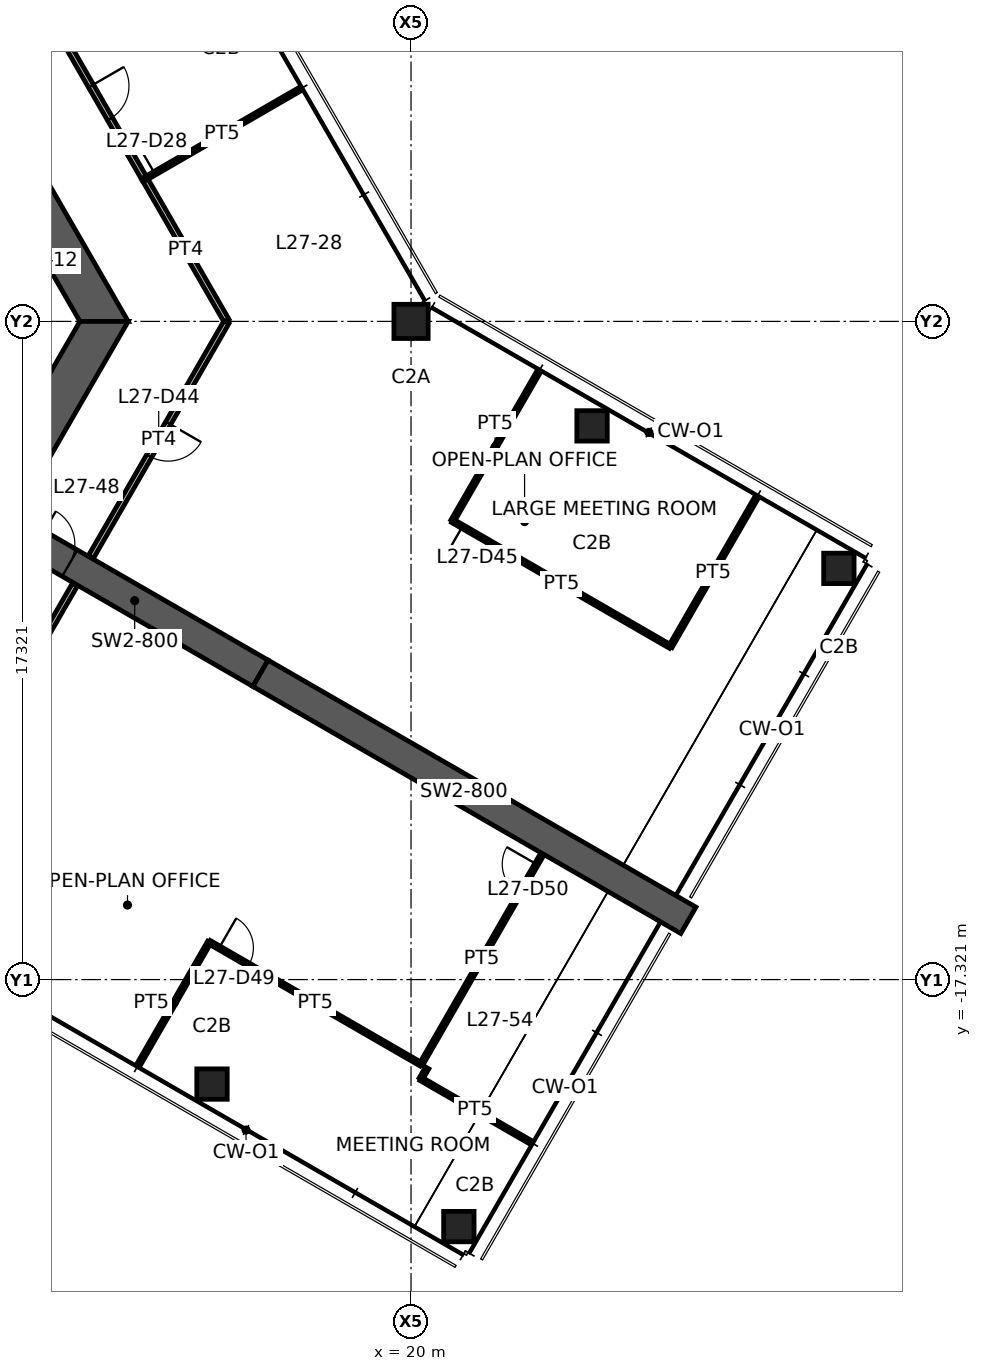
"""IFC4 building model, lengths in metres.
Left out: names, types, materials, properties, quantities, classifications, styles, units other than length and angle.
Written with IfcOpenShell. Run it as: python <this file> out.ifc"""

import sys

from ifc_helpers import new_model, si_unit, direction, frame, frame_2d, origin, origin_2d, place, context, subcontext, project, spatial, polyline, rectangle, hollow_rectangle, outline, extrude, element, fill, save


model = new_model("IFC4")
c1 = context("Model", 3, precision=1e-05, world=origin(), true_north=direction((0.0, 1.0)))
c2 = subcontext(c1, "Body", "Model", "MODEL_VIEW")
j1 = project(units=[si_unit("LENGTHUNIT", "METRE"), si_unit("PLANEANGLEUNIT", "RADIAN")], contexts=[c1])
p1 = place(None, origin())
s1 = spatial("IfcSite", under=j1, at=p1, CompositionType="ELEMENT")
p2 = place(p1, origin())
s2 = spatial("IfcBuilding", under=s1, at=p2, CompositionType="ELEMENT")
p3 = place(p2, frame((0.0, 0.0, 108.0)))
s3 = spatial("IfcBuildingStorey", under=s2, at=p3, CompositionType="ELEMENT", Elevation=108.0)
p4 = place(p3, frame((20.0, 0.0, 0.0), z_axis=(0.0, 0.0, 1.0), x_axis=(1.0, 0.0, 0.0)))
e1 = element("IfcColumn", 1, at=p4, inside=s3, PredefinedType="COLUMN", context=c2, shape_type="SweptSolid", body=[
    extrude(hollow_rectangle(XDim=0.9, YDim=0.9, WallThickness=0.055, at=origin_2d()), origin(), (0.0, 0.0, 1.0), 3.9),
])
for number, where, z_axis, x_axis in (
    (2, (14.763, -20.071, 0.0), (0.0, 0.0, 1.0), (1.0, 0.0, 0.0)),
    (3, (21.258, -23.821, 0.0), (0.0, 0.0, 1.0), (1.0, 0.0, 0.0)),
    (4, (24.763, -2.75, 0.0), (0.0, 0.0, 1.0), (1.0, 0.0, 0.0)),
    (5, (31.258, -6.5, 0.0), (0.0, 0.0, 1.0), (1.0, 0.0, 0.0)),
):
    element("IfcColumn", number, at=place(p3, frame(where, z_axis=z_axis, x_axis=x_axis)), inside=s3, PredefinedType="COLUMN", context=c2, shape_type="SweptSolid", body=[
        extrude(hollow_rectangle(XDim=0.8, YDim=0.8, WallThickness=0.045, at=origin_2d()), origin(), (0.0, 0.0, 1.0), 3.9),
    ])
p5 = place(p3, frame((11.922, 0.0, 0.0), z_axis=(0.0, 0.0, 1.0), x_axis=(-0.500004296715, 0.866022923061, 0.0)))
e6 = element("IfcWall", 6, at=p5, inside=s3, PredefinedType="SHEAR", context=c2, shape_type="SweptSolid", body=[
    extrude(outline(polyline([(-0.318, -0.55), (5.835, -0.55), (6.635, -0.55), (12.24, -0.55), (11.605, 0.55), (6.635, 0.55), (5.835, 0.55), (0.318, 0.55), (-0.318, -0.55)])), origin(), (0.0, 0.0, 1.0), 3.9),
])
p6 = place(p5, frame((5.835, 0.0, 0.0)))
e7 = element("IfcOpeningElement", 7, at=p6, cuts=e6, PredefinedType="OPENING", context=c2, shape_type="SweptSolid", body=[
    extrude(rectangle(XDim=0.8, YDim=2.1, at=frame_2d((0.4, 1.05))), frame((0.0, 0.56, 0.0), z_axis=(0.0, -1.0, 0.0), x_axis=(1.0, 0.0, 0.0)), (0.0, 0.0, 1.0), 1.12),
])
p7 = place(p3, frame((5.961, -10.325, 0.0), z_axis=(0.0, 0.0, 1.0), x_axis=(0.500004296715, 0.866022923061, 0.0)))
e8 = element("IfcWall", 8, at=p7, inside=s3, PredefinedType="SHEAR", context=c2, shape_type="SweptSolid", body=[
    extrude(outline(polyline([(-0.318, -0.55), (4.594, -0.55), (5.394, -0.55), (12.24, -0.55), (11.605, 0.55), (5.394, 0.55), (4.594, 0.55), (0.318, 0.55), (-0.318, -0.55)])), origin(), (0.0, 0.0, 1.0), 3.9),
])
p8 = place(p7, frame((4.594, 0.0, 0.0)))
e9 = element("IfcOpeningElement", 9, at=p8, cuts=e8, PredefinedType="OPENING", context=c2, shape_type="SweptSolid", body=[
    extrude(rectangle(XDim=0.8, YDim=2.1, at=frame_2d((0.4, 1.05))), frame((0.0, 0.56, 0.0), z_axis=(0.0, -1.0, 0.0), x_axis=(1.0, 0.0, 0.0)), (0.0, 0.0, 1.0), 1.12),
])
p9 = place(p3, frame((9.418, -5.438, 0.0), z_axis=(0.0, 0.0, 1.0), x_axis=(0.866029782078, -0.499992416496, 0.0)))
e10 = element("IfcWall", 10, at=p9, inside=s3, PredefinedType="SHEAR", context=c2, shape_type="SweptSolid", body=[
    extrude(rectangle(XDim=7.646, YDim=0.8, at=frame_2d((3.823, 0.0))), origin(), (0.0, 0.0, 1.0), 3.9),
])
p10 = place(p9, frame((0.85, 0.0, 0.0)))
e11 = element("IfcOpeningElement", 11, at=p10, cuts=e10, PredefinedType="OPENING", context=c2, shape_type="SweptSolid", body=[
    extrude(rectangle(XDim=1.0, YDim=2.1, at=frame_2d((0.5, 1.05))), frame((0.0, 0.41, 0.0), z_axis=(0.0, -1.0, 0.0), x_axis=(1.0, 0.0, 0.0)), (0.0, 0.0, 1.0), 0.82),
])
p11 = place(p3, frame((16.039, -9.26, 0.0), z_axis=(0.0, 0.0, 1.0), x_axis=(0.866024837091, -0.50000098154, 0.0)))
e12 = element("IfcWall", 12, at=p11, inside=s3, PredefinedType="SHEAR", context=c2, shape_type="SweptSolid", body=[
    extrude(rectangle(XDim=13.0, YDim=0.8, at=frame_2d((6.5, 0.0))), origin(), (0.0, 0.0, 1.0), 3.9),
])
p12 = place(p3, frame((12.987, 3.755, 0.0), z_axis=(0.0, 0.0, 1.0), x_axis=(0.499980509014, -0.866036656618, 0.0)))
e13 = element("IfcWall", 13, at=p12, inside=s3, PredefinedType="PARTITIONING", context=c2, shape_type="SweptSolid", body=[
    extrude(rectangle(XDim=4.313, YDim=0.15, at=frame_2d((2.157, 0.0))), origin(), (0.0, 0.0, 1.0), 2.95),
])
p13 = place(p3, frame((10.664, 7.779, 0.0), z_axis=(0.0, 0.0, 1.0), x_axis=(0.500008456887, -0.866020521143, 0.0)))
e14 = element("IfcWall", 14, at=p13, inside=s3, PredefinedType="PARTITIONING", context=c2, shape_type="SweptSolid", body=[
    extrude(rectangle(XDim=4.655, YDim=0.15, at=frame_2d((2.328, 0.0))), origin(), (0.0, 0.0, 1.0), 2.95),
])
p14 = place(p13, frame((1.828, 0.0, 0.0)))
e15 = element("IfcOpeningElement", 15, at=p14, cuts=e14, PredefinedType="OPENING", context=c2, shape_type="SweptSolid", body=[
    extrude(rectangle(XDim=1.0, YDim=2.1, at=frame_2d((0.5, 1.05))), frame((0.0, 0.085, 0.0), z_axis=(0.0, -1.0, 0.0), x_axis=(1.0, 0.0, 0.0)), (0.0, 0.0, 1.0), 0.17),
])
p15 = place(p3, frame((12.992, 3.747, 0.0), z_axis=(0.0, 0.0, 1.0), x_axis=(0.865555596133, 0.500812849279, 0.0)))
e16 = element("IfcWall", 16, at=p15, inside=s3, PredefinedType="PARTITIONING", context=c2, shape_type="SweptSolid", body=[
    extrude(rectangle(XDim=4.696, YDim=0.1, at=frame_2d((2.348, 0.0))), origin(), (0.0, 0.0, 1.0), 2.95),
])
p16 = place(p15, frame((0.3, 0.0, 0.0)))
e17 = element("IfcOpeningElement", 17, at=p16, cuts=e16, PredefinedType="OPENING", context=c2, shape_type="SweptSolid", body=[
    extrude(rectangle(XDim=0.9, YDim=2.1, at=frame_2d((0.45, 1.05))), frame((0.0, 0.06, 0.0), z_axis=(0.0, -1.0, 0.0), x_axis=(1.0, 0.0, 0.0)), (0.0, 0.0, 1.0), 0.12),
])
p17 = place(p3, frame((15.144, -0.02, 0.0), z_axis=(0.0, 0.0, 1.0), x_axis=(-0.499985098601, -0.86603400694, 0.0)))
e18 = element("IfcWall", 18, at=p17, inside=s3, PredefinedType="PARTITIONING", context=c2, shape_type="SweptSolid", body=[
    extrude(rectangle(XDim=7.135, YDim=0.15, at=frame_2d((3.567, 0.0))), origin(), (0.0, 0.0, 1.0), 2.95),
])
p18 = place(p17, frame((3.067, 0.0, 0.0)))
e19 = element("IfcOpeningElement", 19, at=p18, cuts=e18, PredefinedType="OPENING", context=c2, shape_type="SweptSolid", body=[
    extrude(rectangle(XDim=1.0, YDim=2.1, at=frame_2d((0.5, 1.05))), frame((0.0, 0.085, 0.0), z_axis=(0.0, -1.0, 0.0), x_axis=(1.0, 0.0, 0.0)), (0.0, 0.0, 1.0), 0.17),
])
p19 = place(p3, frame((21.092, -5.25, 0.0), z_axis=(0.0, 0.0, 1.0), x_axis=(0.499989762656, 0.866031314237, 0.0)))
e20 = element("IfcWall", 20, at=p19, inside=s3, PredefinedType="PARTITIONING", context=c2, shape_type="SweptSolid", body=[
    extrude(rectangle(XDim=4.48, YDim=0.1, at=frame_2d((2.24, 0.0))), origin(), (0.0, 0.0, 1.0), 2.95),
])
p20 = place(p3, frame((26.825, -8.559, 0.0), z_axis=(0.0, 0.0, 1.0), x_axis=(-0.866037567856, 0.499978930619, 0.0)))
e21 = element("IfcWall", 21, at=p20, inside=s3, PredefinedType="PARTITIONING", context=c2, shape_type="SweptSolid", body=[
    extrude(rectangle(XDim=6.619, YDim=0.1, at=frame_2d((3.31, 0.0))), origin(), (0.0, 0.0, 1.0), 2.95),
])
p21 = place(p20, frame((5.42, 0.0, 0.0)))
e22 = element("IfcOpeningElement", 22, at=p21, cuts=e21, PredefinedType="OPENING", context=c2, shape_type="SweptSolid", body=[
    extrude(rectangle(XDim=0.9, YDim=2.1, at=frame_2d((0.45, 1.05))), frame((0.0, 0.06, 0.0), z_axis=(0.0, -1.0, 0.0), x_axis=(1.0, 0.0, 0.0)), (0.0, 0.0, 1.0), 0.12),
])
p22 = place(p3, frame((29.075, -4.662, 0.0), z_axis=(0.0, 0.0, 1.0), x_axis=(-0.500013631625, -0.866017533419, 0.0)))
e23 = element("IfcWall", 23, at=p22, inside=s3, PredefinedType="PARTITIONING", context=c2, shape_type="SweptSolid", body=[
    extrude(rectangle(XDim=4.5, YDim=0.1, at=frame_2d((2.25, 0.0))), origin(), (0.0, 0.0, 1.0), 2.95),
])
p23 = place(p3, frame((11.156, -6.926, 0.0), z_axis=(0.0, 0.0, 1.0), x_axis=(-0.500001961223, -0.866024271469, 0.0)))
e24 = element("IfcWall", 24, at=p23, inside=s3, PredefinedType="PARTITIONING", context=c2, shape_type="SweptSolid", body=[
    extrude(rectangle(XDim=7.158, YDim=0.15, at=frame_2d((3.579, 0.0))), origin(), (0.0, 0.0, 1.0), 2.95),
])
p24 = place(p23, frame((3.079, 0.0, 0.0)))
e25 = element("IfcOpeningElement", 25, at=p24, cuts=e24, PredefinedType="OPENING", context=c2, shape_type="SweptSolid", body=[
    extrude(rectangle(XDim=1.0, YDim=2.1, at=frame_2d((0.5, 1.05))), frame((0.0, 0.085, 0.0), z_axis=(0.0, -1.0, 0.0), x_axis=(1.0, 0.0, 0.0)), (0.0, 0.0, 1.0), 0.17),
])
p25 = place(p3, frame((20.258, -19.933, 0.0), z_axis=(0.0, 0.0, 1.0), x_axis=(0.866015045157, -0.50001794124, 0.0)))
e26 = element("IfcWall", 26, at=p25, inside=s3, PredefinedType="PARTITIONING", context=c2, shape_type="SweptSolid", body=[
    extrude(rectangle(XDim=3.29, YDim=0.1, at=frame_2d((1.645, 0.0))), origin(), (0.0, 0.0, 1.0), 2.95),
])
p26 = place(p3, frame((20.425, -19.644, 0.0), z_axis=(0.0, 0.0, 1.0), x_axis=(-0.500228859883, -0.865893231143, 0.0)))
e27 = element("IfcWall", 27, at=p26, inside=s3, PredefinedType="PARTITIONING", context=c2, shape_type="SweptSolid", body=[
    extrude(rectangle(XDim=0.334, YDim=0.1, at=frame_2d((0.167, 0.0))), origin(), (0.0, 0.0, 1.0), 2.95),
])
p27 = place(p3, frame((12.842, -19.539, 0.0), z_axis=(0.0, 0.0, 1.0), x_axis=(0.499964254978, 0.866046040199, 0.0)))
e28 = element("IfcWall", 28, at=p27, inside=s3, PredefinedType="PARTITIONING", context=c2, shape_type="SweptSolid", body=[
    extrude(rectangle(XDim=3.7, YDim=0.1, at=frame_2d((1.85, 0.0))), origin(), (0.0, 0.0, 1.0), 2.95),
])
p28 = place(p3, frame((14.692, -16.334, 0.0), z_axis=(0.0, 0.0, 1.0), x_axis=(0.866023188807, -0.500003836433, 0.0)))
e29 = element("IfcWall", 29, at=p28, inside=s3, PredefinedType="PARTITIONING", context=c2, shape_type="SweptSolid", body=[
    extrude(rectangle(XDim=6.434, YDim=0.1, at=frame_2d((3.217, 0.0))), origin(), (0.0, 0.0, 1.0), 2.95),
])
p29 = place(p28, frame((0.3, 0.0, 0.0)))
e30 = element("IfcOpeningElement", 30, at=p29, cuts=e29, PredefinedType="OPENING", context=c2, shape_type="SweptSolid", body=[
    extrude(rectangle(XDim=0.9, YDim=2.1, at=frame_2d((0.45, 1.05))), frame((0.0, 0.06, 0.0), z_axis=(0.0, -1.0, 0.0), x_axis=(1.0, 0.0, 0.0)), (0.0, 0.0, 1.0), 0.12),
])
p30 = place(p3, frame((20.264, -19.552, 0.0), z_axis=(0.0, 0.0, 1.0), x_axis=(0.499374576797, 0.866386191054, 0.0)))
e31 = element("IfcWall", 31, at=p30, inside=s3, PredefinedType="PARTITIONING", context=c2, shape_type="SweptSolid", body=[
    extrude(rectangle(XDim=6.38, YDim=0.1, at=frame_2d((3.19, 0.0))), origin(), (0.0, 0.0, 1.0), 2.95),
])
p31 = place(p30, frame((5.18, 0.0, 0.0)))
e32 = element("IfcOpeningElement", 32, at=p31, cuts=e31, PredefinedType="OPENING", context=c2, shape_type="SweptSolid", body=[
    extrude(rectangle(XDim=0.9, YDim=2.1, at=frame_2d((0.45, 1.05))), frame((0.0, 0.06, 0.0), z_axis=(0.0, -1.0, 0.0), x_axis=(1.0, 0.0, 0.0)), (0.0, 0.0, 1.0), 0.12),
])
p32 = place(p10, origin())
e33 = element("IfcDoor", 33, at=p32, inside=s3, OperationType="SINGLE_SWING_LEFT", PredefinedType="DOOR", context=c2, shape_type="SweptSolid", body=[
    extrude(rectangle(XDim=1.0, YDim=2.1, at=frame_2d((0.5, 1.05))), frame((0.0, 0.025, 0.0), z_axis=(0.0, -1.0, 0.0), x_axis=(1.0, 0.0, 0.0)), (0.0, 0.0, 1.0), 0.05),
])
fill(e11, e33)
p33 = place(p14, origin())
e34 = element("IfcDoor", 34, at=p33, inside=s3, OperationType="SINGLE_SWING_LEFT", PredefinedType="DOOR", context=c2, shape_type="SweptSolid", body=[
    extrude(rectangle(XDim=1.0, YDim=2.1, at=frame_2d((0.5, 1.05))), frame((0.0, 0.025, 0.0), z_axis=(0.0, -1.0, 0.0), x_axis=(1.0, 0.0, 0.0)), (0.0, 0.0, 1.0), 0.05),
])
fill(e15, e34)
p34 = place(p16, origin())
e35 = element("IfcDoor", 35, at=p34, inside=s3, OperationType="SINGLE_SWING_LEFT", PredefinedType="DOOR", context=c2, shape_type="SweptSolid", body=[
    extrude(rectangle(XDim=0.9, YDim=2.1, at=frame_2d((0.45, 1.05))), frame((0.0, 0.025, 0.0), z_axis=(0.0, -1.0, 0.0), x_axis=(1.0, 0.0, 0.0)), (0.0, 0.0, 1.0), 0.05),
])
fill(e17, e35)
p35 = place(p18, origin())
e36 = element("IfcDoor", 36, at=p35, inside=s3, OperationType="SINGLE_SWING_LEFT", PredefinedType="DOOR", context=c2, shape_type="SweptSolid", body=[
    extrude(rectangle(XDim=1.0, YDim=2.1, at=frame_2d((0.5, 1.05))), frame((0.0, 0.025, 0.0), z_axis=(0.0, -1.0, 0.0), x_axis=(1.0, 0.0, 0.0)), (0.0, 0.0, 1.0), 0.05),
])
fill(e19, e36)
p36 = place(p21, origin())
e37 = element("IfcDoor", 37, at=p36, inside=s3, OperationType="SINGLE_SWING_RIGHT", PredefinedType="DOOR", context=c2, shape_type="SweptSolid", body=[
    extrude(rectangle(XDim=0.9, YDim=2.1, at=frame_2d((0.45, 1.05))), frame((0.0, 0.025, 0.0), z_axis=(0.0, -1.0, 0.0), x_axis=(1.0, 0.0, 0.0)), (0.0, 0.0, 1.0), 0.05),
])
fill(e22, e37)
p37 = place(p29, origin())
e38 = element("IfcDoor", 38, at=p37, inside=s3, OperationType="SINGLE_SWING_LEFT", PredefinedType="DOOR", context=c2, shape_type="SweptSolid", body=[
    extrude(rectangle(XDim=0.9, YDim=2.1, at=frame_2d((0.45, 1.05))), frame((0.0, 0.025, 0.0), z_axis=(0.0, -1.0, 0.0), x_axis=(1.0, 0.0, 0.0)), (0.0, 0.0, 1.0), 0.05),
])
fill(e30, e38)
p38 = place(p31, origin())
e39 = element("IfcDoor", 39, at=p38, inside=s3, OperationType="SINGLE_SWING_RIGHT", PredefinedType="DOOR", context=c2, shape_type="SweptSolid", body=[
    extrude(rectangle(XDim=0.9, YDim=2.1, at=frame_2d((0.45, 1.05))), frame((0.0, 0.025, 0.0), z_axis=(0.0, -1.0, 0.0), x_axis=(1.0, 0.0, 0.0)), (0.0, 0.0, 1.0), 0.05),
])
fill(e32, e39)
save(model, sys.argv[1])
